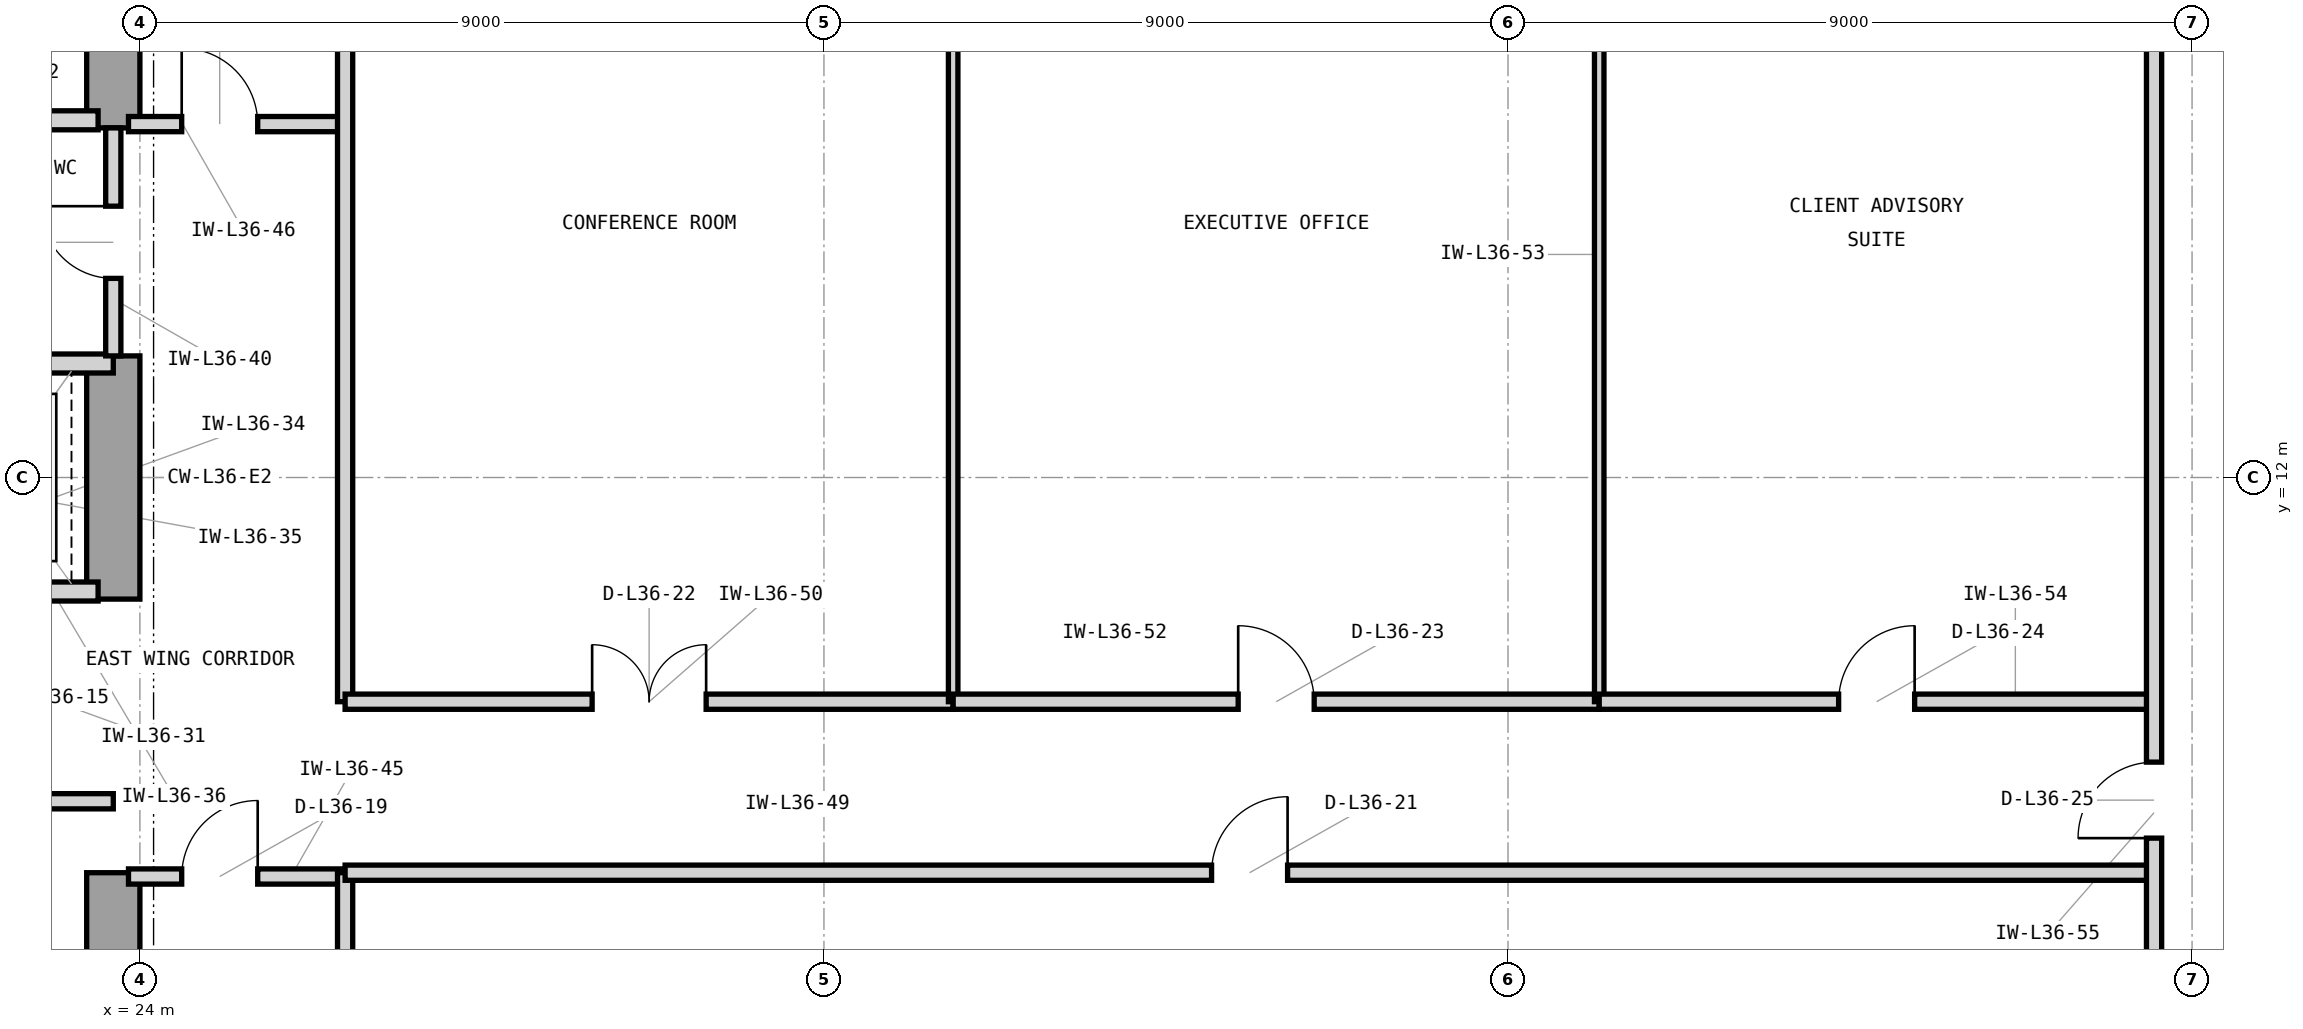
"""IFC4 building model, lengths in metres.
Left out: names, types, materials, properties, quantities, classifications, styles, units other than length and angle.
Written with IfcOpenShell. Run it as: python <this file> out.ifc"""

import sys

from ifc_helpers import new_model, si_unit, direction, frame, frame_2d, origin, place, context, subcontext, project, spatial, rectangle, extrude, element, fill, save


model = new_model("IFC4")
c1 = context("Model", 3, precision=1e-05, world=origin(), true_north=direction((0.0, 1.0)))
c2 = subcontext(c1, "Body", "Model", "MODEL_VIEW")
j1 = project(units=[si_unit("LENGTHUNIT", "METRE"), si_unit("PLANEANGLEUNIT", "RADIAN")], contexts=[c1])
p1 = place(None, origin())
s1 = spatial("IfcSite", under=j1, at=p1, CompositionType="ELEMENT")
p2 = place(p1, origin())
s2 = spatial("IfcBuilding", under=s1, at=p2, CompositionType="ELEMENT")
p3 = place(p2, frame((0.0, 0.0, 151.8)))
s3 = spatial("IfcBuildingStorey", under=s2, at=p3, CompositionType="ELEMENT", Elevation=151.8)
p4 = place(p3, frame((23.65, 3.7, 0.0), z_axis=(0.0, 0.0, 1.0), x_axis=(0.0, 1.0, 0.0)))
e1 = element("IfcWall", 1, at=p4, inside=s3, PredefinedType="SHEAR", context=c2, shape_type="SweptSolid", body=[
    extrude(rectangle(XDim=3.1, YDim=0.7, at=frame_2d((1.55, 0.0))), origin(), (0.0, 0.0, 1.0), 3.9),
])
p5 = place(p3, frame((23.65, 10.4, 0.0), z_axis=(0.0, 0.0, 1.0), x_axis=(0.0, 1.0, 0.0)))
e2 = element("IfcWall", 2, at=p5, inside=s3, PredefinedType="SHEAR", context=c2, shape_type="SweptSolid", body=[
    extrude(rectangle(XDim=3.2, YDim=0.7, at=frame_2d((1.6, 0.0))), origin(), (0.0, 0.0, 1.0), 3.9),
])
p6 = place(p3, frame((23.65, 16.6, 0.0), z_axis=(0.0, 0.0, 1.0), x_axis=(0.0, 1.0, 0.0)))
e3 = element("IfcWall", 3, at=p6, inside=s3, PredefinedType="SHEAR", context=c2, shape_type="SweptSolid", body=[
    extrude(rectangle(XDim=4.05, YDim=0.7, at=frame_2d((2.025, 0.0))), origin(), (0.0, 0.0, 1.0), 3.9),
])
p7 = place(p3, frame((21.05, 16.7, 0.0), z_axis=(0.0, 0.0, 1.0), x_axis=(1.0, 0.0, 0.0)))
e4 = element("IfcWall", 4, at=p7, inside=s3, PredefinedType="PARTITIONING", context=c2, shape_type="SweptSolid", body=[
    extrude(rectangle(XDim=2.4, YDim=0.25, at=frame_2d((1.2, 0.0))), origin(), (0.0, 0.0, 1.0), 3.066),
])
p8 = place(p3, frame((17.5, 7.74, 0.0), z_axis=(0.0, 0.0, 1.0), x_axis=(1.0, 0.0, 0.0)))
e5 = element("IfcWall", 5, at=p8, inside=s3, PredefinedType="PARTITIONING", context=c2, shape_type="SweptSolid", body=[
    extrude(rectangle(XDim=6.15, YDim=0.2, at=frame_2d((3.075, 0.0))), origin(), (0.0, 0.0, 1.0), 3.61),
])
p9 = place(p8, frame((2.575, 0.0, 0.0)))
e6 = element("IfcOpeningElement", 6, at=p9, cuts=e5, PredefinedType="OPENING", context=c2, shape_type="SweptSolid", body=[
    extrude(rectangle(XDim=1.0, YDim=2.15, at=frame_2d((0.5, 1.075))), frame((0.0, 0.11, 0.0), z_axis=(0.0, -1.0, 0.0), x_axis=(1.0, 0.0, 0.0)), (0.0, 0.0, 1.0), 0.22),
])
p10 = place(p3, frame((21.05, 10.5, 0.0), z_axis=(0.0, 0.0, 1.0), x_axis=(1.0, 0.0, 0.0)))
e7 = element("IfcWall", 7, at=p10, inside=s3, PredefinedType="PARTITIONING", context=c2, shape_type="SweptSolid", body=[
    extrude(rectangle(XDim=2.4, YDim=0.25, at=frame_2d((1.2, 0.0))), origin(), (0.0, 0.0, 1.0), 3.066),
])
p11 = place(p10, frame((0.48, 0.0, 0.0)))
e8 = element("IfcOpeningElement", 8, at=p11, cuts=e7, PredefinedType="OPENING", context=c2, shape_type="SweptSolid", body=[
    extrude(rectangle(XDim=1.15, YDim=2.25, at=frame_2d((0.575, 1.125))), frame((0.0, 0.135, 0.0), z_axis=(0.0, -1.0, 0.0), x_axis=(1.0, 0.0, 0.0)), (0.0, 0.0, 1.0), 0.27),
])
p12 = place(p3, frame((14.7, 13.5, 0.0), z_axis=(0.0, 0.0, 1.0), x_axis=(1.0, 0.0, 0.0)))
e9 = element("IfcWall", 9, at=p12, inside=s3, PredefinedType="PARTITIONING", context=c2, shape_type="SweptSolid", body=[
    extrude(rectangle(XDim=8.95, YDim=0.25, at=frame_2d((4.475, 0.0))), origin(), (0.0, 0.0, 1.0), 3.066),
])
p13 = place(p3, frame((23.65, 13.6, 0.0), z_axis=(0.0, 0.0, 1.0), x_axis=(0.0, 1.0, 0.0)))
e10 = element("IfcWall", 10, at=p13, inside=s3, PredefinedType="PARTITIONING", context=c2, shape_type="SweptSolid", body=[
    extrude(rectangle(XDim=3.0, YDim=0.2, at=frame_2d((1.5, 0.0))), origin(), (0.0, 0.0, 1.0), 3.61),
])
p14 = place(p13, frame((1.02, 0.0, 0.0)))
e11 = element("IfcOpeningElement", 11, at=p14, cuts=e10, PredefinedType="OPENING", context=c2, shape_type="SweptSolid", body=[
    extrude(rectangle(XDim=0.95, YDim=2.1, at=frame_2d((0.475, 1.05))), frame((0.0, 0.11, 0.0), z_axis=(0.0, -1.0, 0.0), x_axis=(1.0, 0.0, 0.0)), (0.0, 0.0, 1.0), 0.22),
])
p15 = place(p3, frame((23.85, 6.75, 0.0), z_axis=(0.0, 0.0, 1.0), x_axis=(1.0, 0.0, 0.0)))
e12 = element("IfcWall", 12, at=p15, inside=s3, PredefinedType="PARTITIONING", context=c2, shape_type="SweptSolid", body=[
    extrude(rectangle(XDim=2.85, YDim=0.2, at=frame_2d((1.425, 0.0))), origin(), (0.0, 0.0, 1.0), 3.61),
])
p16 = place(p15, frame((0.7, 0.0, 0.0)))
e13 = element("IfcOpeningElement", 13, at=p16, cuts=e12, PredefinedType="OPENING", context=c2, shape_type="SweptSolid", body=[
    extrude(rectangle(XDim=1.0, YDim=2.15, at=frame_2d((0.5, 1.075))), frame((0.0, 0.11, 0.0), z_axis=(0.0, -1.0, 0.0), x_axis=(1.0, 0.0, 0.0)), (0.0, 0.0, 1.0), 0.22),
])
p17 = place(p3, frame((23.85, 16.65, 0.0), z_axis=(0.0, 0.0, 1.0), x_axis=(1.0, 0.0, 0.0)))
e14 = element("IfcWall", 14, at=p17, inside=s3, PredefinedType="PARTITIONING", context=c2, shape_type="SweptSolid", body=[
    extrude(rectangle(XDim=2.85, YDim=0.2, at=frame_2d((1.425, 0.0))), origin(), (0.0, 0.0, 1.0), 3.61),
])
p18 = place(p17, frame((0.7, 0.0, 0.0)))
e15 = element("IfcOpeningElement", 15, at=p18, cuts=e14, PredefinedType="OPENING", context=c2, shape_type="SweptSolid", body=[
    extrude(rectangle(XDim=1.0, YDim=2.15, at=frame_2d((0.5, 1.075))), frame((0.0, 0.11, 0.0), z_axis=(0.0, -1.0, 0.0), x_axis=(1.0, 0.0, 0.0)), (0.0, 0.0, 1.0), 0.22),
])
p19 = place(p3, frame((26.7, 3.18, 0.0), z_axis=(0.0, 0.0, 1.0), x_axis=(0.0, 1.0, 0.0)))
e16 = element("IfcWall", 16, at=p19, inside=s3, PredefinedType="PARTITIONING", context=c2, shape_type="SweptSolid", body=[
    extrude(rectangle(XDim=3.62, YDim=0.2, at=frame_2d((1.81, 0.0))), origin(), (0.0, 0.0, 1.0), 3.61),
])
p20 = place(p3, frame((26.7, 9.05, 0.0), z_axis=(0.0, 0.0, 1.0), x_axis=(0.0, 1.0, 0.0)))
e17 = element("IfcWall", 17, at=p20, inside=s3, PredefinedType="PARTITIONING", context=c2, shape_type="SweptSolid", body=[
    extrude(rectangle(XDim=11.77, YDim=0.2, at=frame_2d((5.885, 0.0))), origin(), (0.0, 0.0, 1.0), 3.61),
])
p21 = place(p3, frame((26.7, 6.8, 0.0), z_axis=(0.0, 0.0, 1.0), x_axis=(1.0, 0.0, 0.0)))
e18 = element("IfcWall", 18, at=p21, inside=s3, PredefinedType="PARTITIONING", context=c2, shape_type="SweptSolid", body=[
    extrude(rectangle(XDim=23.8, YDim=0.2, at=frame_2d((11.9, 0.0))), origin(), (0.0, 0.0, 1.0), 3.61),
])
p22 = place(p21, frame((11.4, 0.0, 0.0)))
e19 = element("IfcOpeningElement", 19, at=p22, cuts=e18, PredefinedType="OPENING", context=c2, shape_type="SweptSolid", body=[
    extrude(rectangle(XDim=1.0, YDim=2.15, at=frame_2d((0.5, 1.075))), frame((0.0, 0.11, 0.0), z_axis=(0.0, -1.0, 0.0), x_axis=(1.0, 0.0, 0.0)), (0.0, 0.0, 1.0), 0.22),
])
p23 = place(p3, frame((26.7, 9.05, 0.0), z_axis=(0.0, 0.0, 1.0), x_axis=(1.0, 0.0, 0.0)))
e20 = element("IfcWall", 20, at=p23, inside=s3, PredefinedType="PARTITIONING", context=c2, shape_type="SweptSolid", body=[
    extrude(rectangle(XDim=8.0, YDim=0.2, at=frame_2d((4.0, 0.0))), origin(), (0.0, 0.0, 1.0), 3.066),
])
p24 = place(p23, frame((3.25, 0.0, 0.0)))
e21 = element("IfcOpeningElement", 21, at=p24, cuts=e20, PredefinedType="OPENING", context=c2, shape_type="SweptSolid", body=[
    extrude(rectangle(XDim=1.5, YDim=2.3, at=frame_2d((0.75, 1.15))), frame((0.0, 0.11, 0.0), z_axis=(0.0, -1.0, 0.0), x_axis=(1.0, 0.0, 0.0)), (0.0, 0.0, 1.0), 0.22),
])
p25 = place(p3, frame((34.7, 9.05, 0.0), z_axis=(0.0, 0.0, 1.0), x_axis=(0.0, 1.0, 0.0)))
e22 = element("IfcWall", 22, at=p25, inside=s3, PredefinedType="PARTITIONING", context=c2, shape_type="SweptSolid", body=[
    extrude(rectangle(XDim=11.77, YDim=0.125, at=frame_2d((5.885, 0.0))), origin(), (0.0, 0.0, 1.0), 3.61),
])
p26 = place(p3, frame((34.7, 9.05, 0.0), z_axis=(0.0, 0.0, 1.0), x_axis=(1.0, 0.0, 0.0)))
e23 = element("IfcWall", 23, at=p26, inside=s3, PredefinedType="PARTITIONING", context=c2, shape_type="SweptSolid", body=[
    extrude(rectangle(XDim=8.5, YDim=0.2, at=frame_2d((4.25, 0.0))), origin(), (0.0, 0.0, 1.0), 3.066),
])
p27 = place(p26, frame((3.75, 0.0, 0.0)))
e24 = element("IfcOpeningElement", 24, at=p27, cuts=e23, PredefinedType="OPENING", context=c2, shape_type="SweptSolid", body=[
    extrude(rectangle(XDim=1.0, YDim=2.15, at=frame_2d((0.5, 1.075))), frame((0.0, 0.11, 0.0), z_axis=(0.0, -1.0, 0.0), x_axis=(1.0, 0.0, 0.0)), (0.0, 0.0, 1.0), 0.22),
])
p28 = place(p3, frame((43.2, 9.05, 0.0), z_axis=(0.0, 0.0, 1.0), x_axis=(0.0, 1.0, 0.0)))
e25 = element("IfcWall", 25, at=p28, inside=s3, PredefinedType="PARTITIONING", context=c2, shape_type="SweptSolid", body=[
    extrude(rectangle(XDim=11.77, YDim=0.125, at=frame_2d((5.885, 0.0))), origin(), (0.0, 0.0, 1.0), 3.61),
])
p29 = place(p3, frame((43.2, 9.05, 0.0), z_axis=(0.0, 0.0, 1.0), x_axis=(1.0, 0.0, 0.0)))
e26 = element("IfcWall", 26, at=p29, inside=s3, PredefinedType="PARTITIONING", context=c2, shape_type="SweptSolid", body=[
    extrude(rectangle(XDim=7.3, YDim=0.2, at=frame_2d((3.65, 0.0))), origin(), (0.0, 0.0, 1.0), 3.066),
])
p30 = place(p29, frame((3.15, 0.0, 0.0)))
e27 = element("IfcOpeningElement", 27, at=p30, cuts=e26, PredefinedType="OPENING", context=c2, shape_type="SweptSolid", body=[
    extrude(rectangle(XDim=1.0, YDim=2.15, at=frame_2d((0.5, 1.075))), frame((0.0, 0.11, 0.0), z_axis=(0.0, -1.0, 0.0), x_axis=(1.0, 0.0, 0.0)), (0.0, 0.0, 1.0), 0.22),
])
p31 = place(p3, frame((50.5, 3.18, 0.0), z_axis=(0.0, 0.0, 1.0), x_axis=(0.0, 1.0, 0.0)))
e28 = element("IfcWall", 28, at=p31, inside=s3, PredefinedType="PARTITIONING", context=c2, shape_type="SweptSolid", body=[
    extrude(rectangle(XDim=17.64, YDim=0.2, at=frame_2d((8.82, 0.0))), origin(), (0.0, 0.0, 1.0), 3.61),
])
p32 = place(p31, frame((4.075, 0.0, 0.0)))
e29 = element("IfcOpeningElement", 29, at=p32, cuts=e28, PredefinedType="OPENING", context=c2, shape_type="SweptSolid", body=[
    extrude(rectangle(XDim=1.0, YDim=2.15, at=frame_2d((0.5, 1.075))), frame((0.0, 0.11, 0.0), z_axis=(0.0, -1.0, 0.0), x_axis=(1.0, 0.0, 0.0)), (0.0, 0.0, 1.0), 0.22),
])
p33 = place(p14, origin())
e30 = element("IfcDoor", 30, at=p33, inside=s3, OperationType="SINGLE_SWING_RIGHT", PredefinedType="DOOR", context=c2, shape_type="SweptSolid", body=[
    extrude(rectangle(XDim=0.95, YDim=2.1, at=frame_2d((0.475, 1.05))), frame((0.0, 0.025, 0.0), z_axis=(0.0, -1.0, 0.0), x_axis=(1.0, 0.0, 0.0)), (0.0, 0.0, 1.0), 0.05),
])
fill(e11, e30)
p34 = place(p16, origin())
e31 = element("IfcDoor", 31, at=p34, inside=s3, OperationType="SINGLE_SWING_RIGHT", PredefinedType="DOOR", context=c2, shape_type="SweptSolid", body=[
    extrude(rectangle(XDim=1.0, YDim=2.15, at=frame_2d((0.5, 1.075))), frame((0.0, 0.025, 0.0), z_axis=(0.0, -1.0, 0.0), x_axis=(1.0, 0.0, 0.0)), (0.0, 0.0, 1.0), 0.05),
])
fill(e13, e31)
p35 = place(p18, origin())
e32 = element("IfcDoor", 32, at=p35, inside=s3, OperationType="SINGLE_SWING_LEFT", PredefinedType="DOOR", context=c2, shape_type="SweptSolid", body=[
    extrude(rectangle(XDim=1.0, YDim=2.15, at=frame_2d((0.5, 1.075))), frame((0.0, 0.025, 0.0), z_axis=(0.0, -1.0, 0.0), x_axis=(1.0, 0.0, 0.0)), (0.0, 0.0, 1.0), 0.05),
])
fill(e15, e32)
p36 = place(p22, origin())
e33 = element("IfcDoor", 33, at=p36, inside=s3, OperationType="SINGLE_SWING_RIGHT", PredefinedType="DOOR", context=c2, shape_type="SweptSolid", body=[
    extrude(rectangle(XDim=1.0, YDim=2.15, at=frame_2d((0.5, 1.075))), frame((0.0, 0.025, 0.0), z_axis=(0.0, -1.0, 0.0), x_axis=(1.0, 0.0, 0.0)), (0.0, 0.0, 1.0), 0.05),
])
fill(e19, e33)
p37 = place(p24, origin())
e34 = element("IfcDoor", 34, at=p37, inside=s3, OperationType="DOUBLE_DOOR_SINGLE_SWING", PredefinedType="DOOR", context=c2, shape_type="SweptSolid", body=[
    extrude(rectangle(XDim=1.5, YDim=2.3, at=frame_2d((0.75, 1.15))), frame((0.0, 0.025, 0.0), z_axis=(0.0, -1.0, 0.0), x_axis=(1.0, 0.0, 0.0)), (0.0, 0.0, 1.0), 0.05),
])
fill(e21, e34)
p38 = place(p27, origin())
e35 = element("IfcDoor", 35, at=p38, inside=s3, OperationType="SINGLE_SWING_LEFT", PredefinedType="DOOR", context=c2, shape_type="SweptSolid", body=[
    extrude(rectangle(XDim=1.0, YDim=2.15, at=frame_2d((0.5, 1.075))), frame((0.0, 0.025, 0.0), z_axis=(0.0, -1.0, 0.0), x_axis=(1.0, 0.0, 0.0)), (0.0, 0.0, 1.0), 0.05),
])
fill(e24, e35)
p39 = place(p30, origin())
e36 = element("IfcDoor", 36, at=p39, inside=s3, OperationType="SINGLE_SWING_RIGHT", PredefinedType="DOOR", context=c2, shape_type="SweptSolid", body=[
    extrude(rectangle(XDim=1.0, YDim=2.15, at=frame_2d((0.5, 1.075))), frame((0.0, 0.025, 0.0), z_axis=(0.0, -1.0, 0.0), x_axis=(1.0, 0.0, 0.0)), (0.0, 0.0, 1.0), 0.05),
])
fill(e27, e36)
p40 = place(p32, origin())
e37 = element("IfcDoor", 37, at=p40, inside=s3, OperationType="SINGLE_SWING_LEFT", PredefinedType="DOOR", context=c2, shape_type="SweptSolid", body=[
    extrude(rectangle(XDim=1.0, YDim=2.15, at=frame_2d((0.5, 1.075))), frame((0.0, 0.025, 0.0), z_axis=(0.0, -1.0, 0.0), x_axis=(1.0, 0.0, 0.0)), (0.0, 0.0, 1.0), 0.05),
])
fill(e29, e37)
save(model, sys.argv[1])
